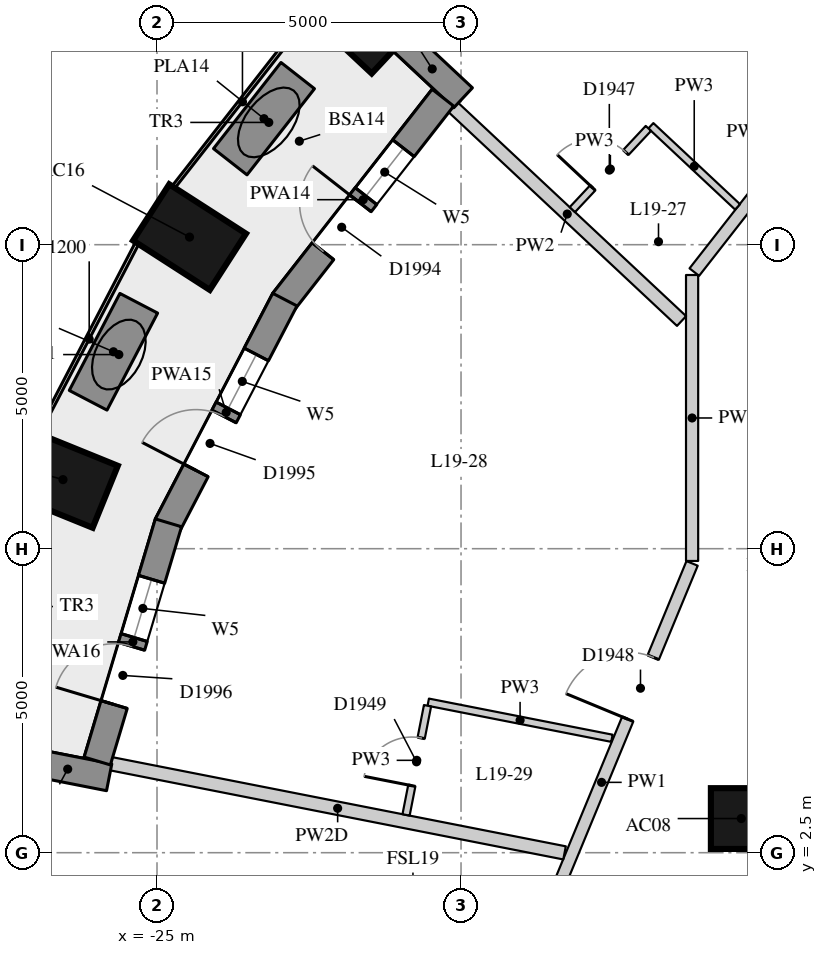
"""IFC4 building model, lengths in metres.
Left out: names, types, materials, properties, quantities, classifications, styles, units other than length and angle.
Written with IfcOpenShell. Run it as: python <this file> out.ifc"""

import sys

from ifc_helpers import new_model, si_unit, direction, frame, frame_2d, origin, origin_2d, place, context, subcontext, project, spatial, rectangle, extrude, element, fill, save


model = new_model("IFC4")
c1 = context("Model", 3, precision=1e-05, world=origin(), true_north=direction((0.0, 1.0)))
c2 = subcontext(c1, "Body", "Model", "MODEL_VIEW")
j1 = project(units=[si_unit("LENGTHUNIT", "METRE"), si_unit("PLANEANGLEUNIT", "RADIAN")], contexts=[c1])
p1 = place(None, origin())
s1 = spatial("IfcSite", under=j1, at=p1, CompositionType="ELEMENT")
p2 = place(p1, origin())
s2 = spatial("IfcBuilding", under=s1, at=p2, CompositionType="ELEMENT")
p3 = place(p2, frame((0.0, 0.0, 71.2)))
s3 = spatial("IfcBuildingStorey", under=s2, at=p3, CompositionType="ELEMENT", Elevation=71.2)
for number, where, z_axis, x_axis in (
    (1, (-21.641, 16.23, 0.0), (0.0, 0.0, 1.0), (-0.73, 0.683, 0.0)),
    (2, (-24.465, 12.625, 0.0), (0.0, 0.0, 1.0), (-0.841, 0.541, 0.0)),
    (3, (-26.546, 8.636, 0.0), (0.0, 0.0, 1.0), (-0.927, 0.376, 0.0)),
):
    element("IfcColumn", number, at=place(p3, frame(where, z_axis=z_axis, x_axis=x_axis)), inside=s3, PredefinedType="COLUMN", context=c2, shape_type="SweptSolid", body=[
        extrude(rectangle(XDim=1.5, YDim=1.1, at=origin_2d()), origin(), (0.0, 0.0, 1.0), 3.3),
    ])
p4 = place(p3, frame((-15.391, 3.062, 0.0), z_axis=(0.0, 0.0, 1.0), x_axis=(1.0, 0.0, 0.0)))
e4 = element("IfcColumn", 4, at=p4, inside=s3, PredefinedType="COLUMN", context=c2, shape_type="SweptSolid", body=[
    extrude(rectangle(XDim=1.0, YDim=1.0, at=origin_2d()), origin(), (0.0, 0.0, 1.0), 3.3),
])
p5 = place(p3, frame((-20.982, 15.866, 0.0), z_axis=(0.0, 0.0, 1.0), x_axis=(0.730062381614, -0.683380508174, 0.0)))
e5 = element("IfcWall", 5, at=p5, inside=s3, PredefinedType="SOLIDWALL", context=c2, shape_type="SweptSolid", body=[
    extrude(rectangle(XDim=1.391, YDim=0.45, at=frame_2d((0.696, 0.0))), origin(), (0.0, 0.0, 1.0), 3.02),
])
p6 = place(p3, frame((-27.151, 4.009, 0.0), z_axis=(0.0, 0.0, 1.0), x_axis=(0.981197182729, -0.1930080014, 0.0)))
e6 = element("IfcWall", 6, at=p6, inside=s3, PredefinedType="SOLIDWALL", context=c2, shape_type="SweptSolid", body=[
    extrude(rectangle(XDim=1.39, YDim=0.45, at=frame_2d((0.695, 0.0))), origin(), (0.0, 0.0, 1.0), 2.47),
])
p7 = place(p3, frame((-20.298, 14.918, 0.0), z_axis=(0.0, 0.0, 1.0), x_axis=(-0.615578403957, -0.788075649022, 0.0)))
e7 = element("IfcWall", 7, at=p7, inside=s3, PredefinedType="SOLIDWALL", context=c2, shape_type="SweptSolid", body=[
    extrude(rectangle(XDim=4.259, YDim=0.45, at=frame_2d((2.129, 0.0))), origin(), (0.0, 0.0, 1.0), 3.02),
])
p8 = place(p7, frame((1.054, 0.0, 0.4)))
e8 = element("IfcOpeningElement", 8, at=p8, cuts=e7, PredefinedType="OPENING", context=c2, shape_type="SweptSolid", body=[
    extrude(rectangle(XDim=1.0, YDim=1.75, at=frame_2d((0.5, 0.875))), frame((0.0, 0.235, 0.0), z_axis=(0.0, -1.0, 0.0), x_axis=(1.0, 0.0, 0.0)), (0.0, 0.0, 1.0), 0.47),
])
p9 = place(p7, frame((2.204, 0.0, 0.0)))
e9 = element("IfcOpeningElement", 9, at=p9, cuts=e7, PredefinedType="OPENING", context=c2, shape_type="SweptSolid", body=[
    extrude(rectangle(XDim=1.0, YDim=2.15, at=frame_2d((0.5, 1.075))), frame((0.0, 0.235, 0.0), z_axis=(0.0, -1.0, 0.0), x_axis=(1.0, 0.0, 0.0)), (0.0, 0.0, 1.0), 0.47),
])
p10 = place(p3, frame((-22.897, 11.597, 0.0), z_axis=(0.0, 0.0, 1.0), x_axis=(-0.461514453451, -0.887132689769, 0.0)))
e10 = element("IfcWall", 10, at=p10, inside=s3, PredefinedType="SOLIDWALL", context=c2, shape_type="SweptSolid", body=[
    extrude(rectangle(XDim=4.183, YDim=0.45, at=frame_2d((2.091, 0.0))), origin(), (0.0, 0.0, 1.0), 3.02),
])
p11 = place(p10, frame((1.016, 0.0, 0.4)))
e11 = element("IfcOpeningElement", 11, at=p11, cuts=e10, PredefinedType="OPENING", context=c2, shape_type="SweptSolid", body=[
    extrude(rectangle(XDim=1.0, YDim=1.75, at=frame_2d((0.5, 0.875))), frame((0.0, 0.235, 0.0), z_axis=(0.0, -1.0, 0.0), x_axis=(1.0, 0.0, 0.0)), (0.0, 0.0, 1.0), 0.47),
])
p12 = place(p10, frame((2.167, 0.0, 0.0)))
e12 = element("IfcOpeningElement", 12, at=p12, cuts=e10, PredefinedType="OPENING", context=c2, shape_type="SweptSolid", body=[
    extrude(rectangle(XDim=1.0, YDim=2.15, at=frame_2d((0.5, 1.075))), frame((0.0, 0.235, 0.0), z_axis=(0.0, -1.0, 0.0), x_axis=(1.0, 0.0, 0.0)), (0.0, 0.0, 1.0), 0.47),
])
p13 = place(p3, frame((-24.812, 7.925, 0.0), z_axis=(0.0, 0.0, 1.0), x_axis=(-0.286389028326, -0.95811341941, 0.0)))
e13 = element("IfcWall", 13, at=p13, inside=s3, PredefinedType="SOLIDWALL", context=c2, shape_type="SweptSolid", body=[
    extrude(rectangle(XDim=4.088, YDim=0.45, at=frame_2d((2.044, 0.0))), origin(), (0.0, 0.0, 1.0), 3.02),
])
p14 = place(p13, frame((0.969, 0.0, 0.4)))
e14 = element("IfcOpeningElement", 14, at=p14, cuts=e13, PredefinedType="OPENING", context=c2, shape_type="SweptSolid", body=[
    extrude(rectangle(XDim=1.0, YDim=1.75, at=frame_2d((0.5, 0.875))), frame((0.0, 0.235, 0.0), z_axis=(0.0, -1.0, 0.0), x_axis=(1.0, 0.0, 0.0)), (0.0, 0.0, 1.0), 0.47),
])
p15 = place(p13, frame((2.119, 0.0, 0.0)))
e15 = element("IfcOpeningElement", 15, at=p15, cuts=e13, PredefinedType="OPENING", context=c2, shape_type="SweptSolid", body=[
    extrude(rectangle(XDim=1.0, YDim=2.15, at=frame_2d((0.5, 1.075))), frame((0.0, 0.235, 0.0), z_axis=(0.0, -1.0, 0.0), x_axis=(1.0, 0.0, 0.0)), (0.0, 0.0, 1.0), 0.47),
])
p16 = place(p3, frame((-22.686, 15.281, 0.0), z_axis=(0.0, 0.0, 1.0), x_axis=(-0.616622746332, -0.787258781282, 0.0)))
e16 = element("IfcWall", 16, at=p16, inside=s3, PredefinedType="USERDEFINED", context=c2, shape_type="SweptSolid", body=[
    extrude(rectangle(XDim=1.8, YDim=0.7, at=frame_2d((0.9, 0.0))), origin(), (0.0, 0.0, 1.0), 0.75),
])
p17 = place(p3, frame((-25.3, 11.537, 0.0), z_axis=(0.0, 0.0, 1.0), x_axis=(-0.462501112253, -0.886618701114, 0.0)))
e17 = element("IfcWall", 17, at=p17, inside=s3, PredefinedType="USERDEFINED", context=c2, shape_type="SweptSolid", body=[
    extrude(rectangle(XDim=1.8, YDim=0.7, at=frame_2d((0.9, 0.0))), origin(), (0.0, 0.0, 1.0), 0.75),
])
p18 = place(p3, frame((-19.177, 0.056, 0.0), z_axis=(0.0, 0.0, 1.0), x_axis=(0.382011450526, 0.924157590277, 0.0)))
e18 = element("IfcWall", 18, at=p18, inside=s3, PredefinedType="PARTITIONING", context=c2, shape_type="SweptSolid", body=[
    extrude(rectangle(XDim=7.794, YDim=0.2, at=frame_2d((3.897, 0.0))), origin(), (0.0, 0.0, 1.0), 3.02),
])
p19 = place(p18, frame((5.022, 0.0, 0.0)))
e19 = element("IfcOpeningElement", 19, at=p19, cuts=e18, PredefinedType="OPENING", context=c2, shape_type="SweptSolid", body=[
    extrude(rectangle(XDim=1.1, YDim=2.1, at=frame_2d((0.55, 1.05))), frame((0.0, 0.11, 0.0), z_axis=(0.0, -1.0, 0.0), x_axis=(1.0, 0.0, 0.0)), (0.0, 0.0, 1.0), 0.22),
])
p20 = place(p18, frame((0.22, 0.0, 0.0)))
e20 = element("IfcOpeningElement", 20, at=p20, cuts=e18, PredefinedType="OPENING", context=c2, shape_type="SweptSolid", body=[
    extrude(rectangle(XDim=1.1, YDim=2.1, at=frame_2d((0.55, 1.05))), frame((0.0, 0.11, 0.0), z_axis=(0.0, -1.0, 0.0), x_axis=(1.0, 0.0, 0.0)), (0.0, 0.0, 1.0), 0.22),
])
p21 = place(p3, frame((-16.2, 7.298, 0.0), z_axis=(0.0, 0.0, 1.0), x_axis=(0.0, 1.0, 0.0)))
e21 = element("IfcWall", 21, at=p21, inside=s3, PredefinedType="PARTITIONING", context=c2, shape_type="SweptSolid", body=[
    extrude(rectangle(XDim=4.703, YDim=0.2, at=frame_2d((2.352, 0.0))), origin(), (0.0, 0.0, 1.0), 3.02),
])
p22 = place(p3, frame((-16.163, 12.049, 0.0), z_axis=(0.0, 0.0, 1.0), x_axis=(0.6157435057, 0.787946657578, 0.0)))
e22 = element("IfcWall", 22, at=p22, inside=s3, PredefinedType="PARTITIONING", context=c2, shape_type="SweptSolid", body=[
    extrude(rectangle(XDim=4.477, YDim=0.2, at=frame_2d((2.239, 0.0))), origin(), (0.0, 0.0, 1.0), 3.02),
])
p23 = place(p3, frame((-20.133, 14.764, 0.0), z_axis=(0.0, 0.0, 1.0), x_axis=(0.730092856427, -0.683347950165, 0.0)))
e23 = element("IfcWall", 23, at=p23, inside=s3, PredefinedType="PARTITIONING", context=c2, shape_type="SweptSolid", body=[
    extrude(rectangle(XDim=5.15, YDim=0.22, at=frame_2d((2.575, 0.0))), origin(), (0.0, 0.0, 1.0), 3.02),
])
p24 = place(p3, frame((-25.761, 3.964, 0.0), z_axis=(0.0, 0.0, 1.0), x_axis=(0.981212489184, -0.192930171486, 0.0)))
e24 = element("IfcWall", 24, at=p24, inside=s3, PredefinedType="PARTITIONING", context=c2, shape_type="SweptSolid", body=[
    extrude(rectangle(XDim=7.606, YDim=0.22, at=frame_2d((3.803, 0.0))), origin(), (0.0, 0.0, 1.0), 2.47),
])
p25 = place(p3, frame((-15.452, 13.122, 0.0), z_axis=(0.0, 0.0, 1.0), x_axis=(-0.730035995084, 0.683408696083, 0.0)))
e25 = element("IfcWall", 25, at=p25, inside=s3, PredefinedType="PARTITIONING", context=c2, shape_type="SweptSolid", body=[
    extrude(rectangle(XDim=1.953, YDim=0.12, at=frame_2d((0.977, 0.0))), origin(), (0.0, 0.0, 1.0), 3.02),
])
p26 = place(p3, frame((-17.518, 4.382, 0.0), z_axis=(0.0, 0.0, 1.0), x_axis=(-0.981212916867, 0.192927996342, 0.0)))
e26 = element("IfcWall", 26, at=p26, inside=s3, PredefinedType="PARTITIONING", context=c2, shape_type="SweptSolid", body=[
    extrude(rectangle(XDim=3.079, YDim=0.12, at=frame_2d((1.54, 0.0))), origin(), (0.0, 0.0, 1.0), 3.02),
])
p27 = place(p3, frame((-16.919, 14.413, 0.0), z_axis=(0.0, 0.0, 1.0), x_axis=(-0.683306289544, -0.730131847456, 0.0)))
e27 = element("IfcWall", 27, at=p27, inside=s3, PredefinedType="PARTITIONING", context=c2, shape_type="SweptSolid", body=[
    extrude(rectangle(XDim=1.83, YDim=0.12, at=frame_2d((0.915, 0.0))), origin(), (0.0, 0.0, 1.0), 3.02),
])
p28 = place(p27, frame((0.54, 0.0, 0.0)))
e28 = element("IfcOpeningElement", 28, at=p28, cuts=e27, PredefinedType="OPENING", context=c2, shape_type="SweptSolid", body=[
    extrude(rectangle(XDim=0.8, YDim=2.1, at=frame_2d((0.4, 1.05))), frame((0.0, 0.07, 0.0), z_axis=(0.0, -1.0, 0.0), x_axis=(1.0, 0.0, 0.0)), (0.0, 0.0, 1.0), 0.14),
])
p29 = place(p3, frame((-20.551, 4.917, 0.0), z_axis=(0.0, 0.0, 1.0), x_axis=(-0.19288291118, -0.981221780524, 0.0)))
e29 = element("IfcWall", 29, at=p29, inside=s3, PredefinedType="PARTITIONING", context=c2, shape_type="SweptSolid", body=[
    extrude(rectangle(XDim=1.83, YDim=0.12, at=frame_2d((0.915, 0.0))), origin(), (0.0, 0.0, 1.0), 3.02),
])
p30 = place(p29, frame((0.54, 0.0, 0.0)))
e30 = element("IfcOpeningElement", 30, at=p30, cuts=e29, PredefinedType="OPENING", context=c2, shape_type="SweptSolid", body=[
    extrude(rectangle(XDim=0.8, YDim=2.1, at=frame_2d((0.4, 1.05))), frame((0.0, 0.07, 0.0), z_axis=(0.0, -1.0, 0.0), x_axis=(1.0, 0.0, 0.0)), (0.0, 0.0, 1.0), 0.14),
])
p31 = place(p8, origin())
e31 = element("IfcWindow", 31, at=p31, inside=s3, PartitioningType="SINGLE_PANEL", PredefinedType="WINDOW", context=c2, shape_type="SweptSolid", body=[
    extrude(rectangle(XDim=1.0, YDim=1.75, at=frame_2d((0.5, 0.875))), frame((0.0, 0.035, 0.0), z_axis=(0.0, -1.0, 0.0), x_axis=(1.0, 0.0, 0.0)), (0.0, 0.0, 1.0), 0.06),
])
fill(e8, e31)
p32 = place(p9, frame((1.0, 0.0, 0.0), z_axis=(0.0, 0.0, 1.0), x_axis=(-1.0, 0.0, 0.0)))
e32 = element("IfcDoor", 32, at=p32, inside=s3, OperationType="SINGLE_SWING_RIGHT", PredefinedType="DOOR", context=c2, shape_type="SweptSolid", body=[
    extrude(rectangle(XDim=1.0, YDim=2.15, at=frame_2d((0.5, 1.075))), frame((0.0, 0.075, 0.0), z_axis=(0.0, -1.0, 0.0), x_axis=(1.0, 0.0, 0.0)), (0.0, 0.0, 1.0), 0.05),
])
fill(e9, e32)
p33 = place(p11, origin())
e33 = element("IfcWindow", 33, at=p33, inside=s3, PartitioningType="SINGLE_PANEL", PredefinedType="WINDOW", context=c2, shape_type="SweptSolid", body=[
    extrude(rectangle(XDim=1.0, YDim=1.75, at=frame_2d((0.5, 0.875))), frame((0.0, 0.035, 0.0), z_axis=(0.0, -1.0, 0.0), x_axis=(1.0, 0.0, 0.0)), (0.0, 0.0, 1.0), 0.06),
])
fill(e11, e33)
p34 = place(p12, frame((1.0, 0.0, 0.0), z_axis=(0.0, 0.0, 1.0), x_axis=(-1.0, 0.0, 0.0)))
e34 = element("IfcDoor", 34, at=p34, inside=s3, OperationType="SINGLE_SWING_LEFT", PredefinedType="DOOR", context=c2, shape_type="SweptSolid", body=[
    extrude(rectangle(XDim=1.0, YDim=2.15, at=frame_2d((0.5, 1.075))), frame((0.0, 0.075, 0.0), z_axis=(0.0, -1.0, 0.0), x_axis=(1.0, 0.0, 0.0)), (0.0, 0.0, 1.0), 0.05),
])
fill(e12, e34)
p35 = place(p14, origin())
e35 = element("IfcWindow", 35, at=p35, inside=s3, PartitioningType="SINGLE_PANEL", PredefinedType="WINDOW", context=c2, shape_type="SweptSolid", body=[
    extrude(rectangle(XDim=1.0, YDim=1.75, at=frame_2d((0.5, 0.875))), frame((0.0, 0.035, 0.0), z_axis=(0.0, -1.0, 0.0), x_axis=(1.0, 0.0, 0.0)), (0.0, 0.0, 1.0), 0.06),
])
fill(e14, e35)
p36 = place(p15, frame((1.0, 0.0, 0.0), z_axis=(0.0, 0.0, 1.0), x_axis=(-1.0, 0.0, 0.0)))
e36 = element("IfcDoor", 36, at=p36, inside=s3, OperationType="SINGLE_SWING_LEFT", PredefinedType="DOOR", context=c2, shape_type="SweptSolid", body=[
    extrude(rectangle(XDim=1.0, YDim=2.15, at=frame_2d((0.5, 1.075))), frame((0.0, 0.075, 0.0), z_axis=(0.0, -1.0, 0.0), x_axis=(1.0, 0.0, 0.0)), (0.0, 0.0, 1.0), 0.05),
])
fill(e15, e36)
p37 = place(p28, origin())
e37 = element("IfcDoor", 37, at=p37, inside=s3, OperationType="SINGLE_SWING_LEFT", PredefinedType="DOOR", context=c2, shape_type="SweptSolid", body=[
    extrude(rectangle(XDim=0.8, YDim=2.1, at=frame_2d((0.4, 1.05))), frame((0.0, 0.025, 0.0), z_axis=(0.0, -1.0, 0.0), x_axis=(1.0, 0.0, 0.0)), (0.0, 0.0, 1.0), 0.05),
])
fill(e28, e37)
p38 = place(p19, origin())
e38 = element("IfcDoor", 38, at=p38, inside=s3, OperationType="SINGLE_SWING_LEFT", PredefinedType="DOOR", context=c2, shape_type="SweptSolid", body=[
    extrude(rectangle(XDim=1.1, YDim=2.1, at=frame_2d((0.55, 1.05))), frame((0.0, 0.025, 0.0), z_axis=(0.0, -1.0, 0.0), x_axis=(1.0, 0.0, 0.0)), (0.0, 0.0, 1.0), 0.05),
])
fill(e19, e38)
p39 = place(p30, origin())
e39 = element("IfcDoor", 39, at=p39, inside=s3, OperationType="SINGLE_SWING_LEFT", PredefinedType="DOOR", context=c2, shape_type="SweptSolid", body=[
    extrude(rectangle(XDim=0.8, YDim=2.1, at=frame_2d((0.4, 1.05))), frame((0.0, 0.025, 0.0), z_axis=(0.0, -1.0, 0.0), x_axis=(1.0, 0.0, 0.0)), (0.0, 0.0, 1.0), 0.05),
])
fill(e30, e39)
save(model, sys.argv[1])
